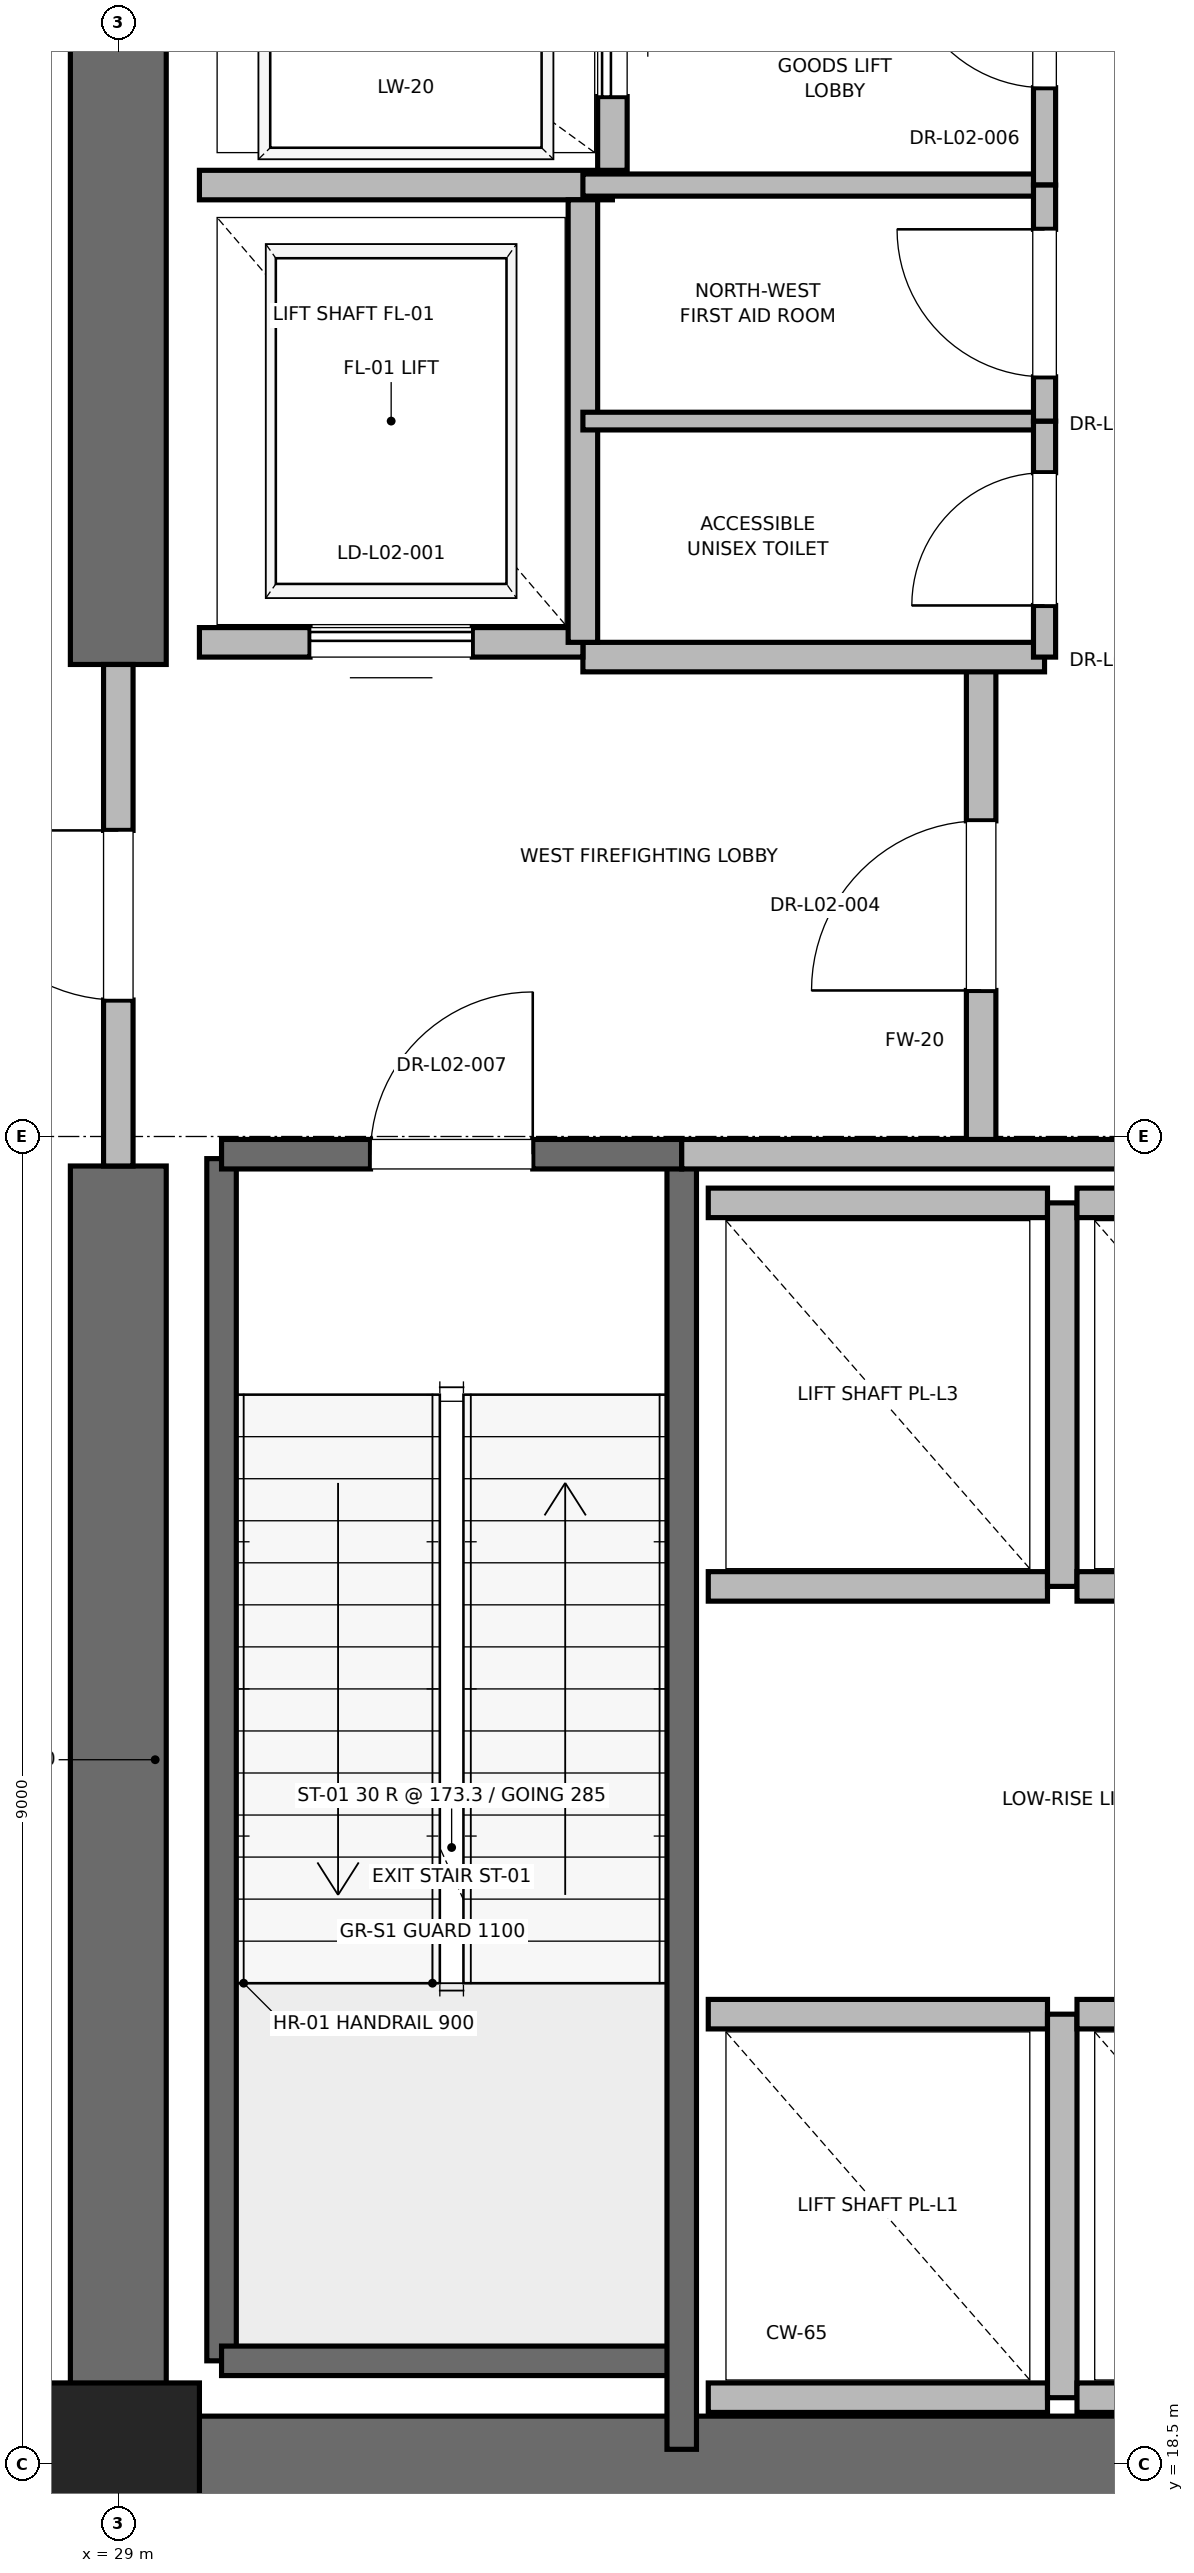
"""IFC4 building model, lengths in metres.
Left out: names, types, materials, properties, quantities, classifications, styles, units other than length and angle.
Written with IfcOpenShell. Run it as: python <this file> out.ifc"""

import sys

from ifc_helpers import new_model, si_unit, direction, frame, frame_2d, origin, origin_2d, place, context, subcontext, project, spatial, rectangle, extrude, element, fill, save


model = new_model("IFC4")
c1 = context("Model", 3, precision=1e-05, world=origin(), true_north=direction((0.0, 1.0)))
c2 = subcontext(c1, "Body", "Model", "MODEL_VIEW")
j1 = project(units=[si_unit("LENGTHUNIT", "METRE"), si_unit("PLANEANGLEUNIT", "RADIAN")], contexts=[c1])
p1 = place(None, origin())
s1 = spatial("IfcSite", under=j1, at=p1, CompositionType="ELEMENT")
p2 = place(p1, origin())
s2 = spatial("IfcBuilding", under=s1, at=p2, CompositionType="ELEMENT")
p3 = place(p2, frame((0.0, 0.0, 11.2)))
s3 = spatial("IfcBuildingStorey", under=s2, at=p3, CompositionType="ELEMENT", Elevation=11.2)
p4 = place(p3, frame((29.0, 18.5, 0.0), z_axis=(0.0, 0.0, 1.0), x_axis=(1.0, 0.0, 0.0)))
e1 = element("IfcColumn", 1, at=p4, inside=s3, PredefinedType="PILASTER", context=c2, shape_type="SweptSolid", body=[
    extrude(rectangle(XDim=1.1, YDim=1.1, at=origin_2d()), origin(), (0.0, 0.0, 1.0), 5.2),
])
p5 = place(p3, frame((29.0, 18.5, 0.0), z_axis=(0.0, 0.0, 1.0), x_axis=(1.0, 0.0, 0.0)))
e2 = element("IfcWall", 2, at=p5, inside=s3, PredefinedType="SHEAR", context=c2, shape_type="SweptSolid", body=[
    extrude(rectangle(XDim=9.2, YDim=0.65, at=frame_2d((4.6, 0.0))), origin(), (0.0, 0.0, 1.0), 4.92),
])
p6 = place(p3, frame((29.0, 18.5, 0.0), z_axis=(0.0, 0.0, 1.0), x_axis=(0.0, 1.0, 0.0)))
e3 = element("IfcWall", 3, at=p6, inside=s3, PredefinedType="SHEAR", context=c2, shape_type="SweptSolid", body=[
    extrude(rectangle(XDim=8.8, YDim=0.65, at=frame_2d((4.4, 0.0))), origin(), (0.0, 0.0, 1.0), 4.92),
])
p7 = place(p3, frame((29.0, 30.7, 0.0), z_axis=(0.0, 0.0, 1.0), x_axis=(0.0, 1.0, 0.0)))
e4 = element("IfcWall", 4, at=p7, inside=s3, PredefinedType="SHEAR", context=c2, shape_type="SweptSolid", body=[
    extrude(rectangle(XDim=5.8, YDim=0.65, at=frame_2d((2.9, 0.0))), origin(), (0.0, 0.0, 1.0), 4.92),
])
p8 = place(p3, frame((29.7, 19.2, 0.0), z_axis=(0.0, 0.0, 1.0), x_axis=(0.0, 1.0, 0.0)))
e5 = element("IfcWall", 5, at=p8, inside=s3, PredefinedType="SOLIDWALL", context=c2, shape_type="SweptSolid", body=[
    extrude(rectangle(XDim=8.15, YDim=0.2, at=frame_2d((4.075, 0.0))), origin(), (0.0, 0.0, 1.0), 4.92),
])
p9 = place(p3, frame((29.7, 19.2, 0.0), z_axis=(0.0, 0.0, 1.0), x_axis=(1.0, 0.0, 0.0)))
e6 = element("IfcWall", 6, at=p9, inside=s3, PredefinedType="SOLIDWALL", context=c2, shape_type="SweptSolid", body=[
    extrude(rectangle(XDim=3.12, YDim=0.2, at=frame_2d((1.56, 0.0))), origin(), (0.0, 0.0, 1.0), 4.92),
])
p10 = place(p3, frame((32.82, 18.6, 0.0), z_axis=(0.0, 0.0, 1.0), x_axis=(0.0, 1.0, 0.0)))
e7 = element("IfcWall", 7, at=p10, inside=s3, PredefinedType="SOLIDWALL", context=c2, shape_type="SweptSolid", body=[
    extrude(rectangle(XDim=8.78, YDim=0.2, at=frame_2d((4.39, 0.0))), origin(), (0.0, 0.0, 1.0), 4.92),
])
p11 = place(p3, frame((29.7, 27.38, 0.0), z_axis=(0.0, 0.0, 1.0), x_axis=(1.0, 0.0, 0.0)))
e8 = element("IfcWall", 8, at=p11, inside=s3, PredefinedType="SOLIDWALL", context=c2, shape_type="SweptSolid", body=[
    extrude(rectangle(XDim=3.12, YDim=0.2, at=frame_2d((1.56, 0.0))), origin(), (0.0, 0.0, 1.0), 4.92),
])
p12 = place(p11, frame((1.01, 0.0, 0.0)))
e9 = element("IfcOpeningElement", 9, at=p12, cuts=e8, PredefinedType="OPENING", context=c2, shape_type="SweptSolid", body=[
    extrude(rectangle(XDim=1.1, YDim=2.15, at=frame_2d((0.55, 1.075))), frame((0.0, 0.1, 0.0), z_axis=(0.0, -1.0, 0.0), x_axis=(1.0, 0.0, 0.0)), (0.0, 0.0, 1.0), 0.2),
])
p13 = place(p3, frame((34.85, 27.38, 0.0), z_axis=(0.0, 0.0, 1.0), x_axis=(0.0, 1.0, 0.0)))
e10 = element("IfcWall", 10, at=p13, inside=s3, PredefinedType="PARTITIONING", context=c2, shape_type="SweptSolid", body=[
    extrude(rectangle(XDim=3.37, YDim=0.2, at=frame_2d((1.685, 0.0))), origin(), (0.0, 0.0, 1.0), 4.92),
])
p14 = place(p13, frame((1.11, 0.0, 0.0)))
e11 = element("IfcOpeningElement", 11, at=p14, cuts=e10, PredefinedType="OPENING", context=c2, shape_type="SweptSolid", body=[
    extrude(rectangle(XDim=1.15, YDim=2.2, at=frame_2d((0.575, 1.1))), frame((0.0, 0.1, 0.0), z_axis=(0.0, -1.0, 0.0), x_axis=(1.0, 0.0, 0.0)), (0.0, 0.0, 1.0), 0.2),
])
p15 = place(p3, frame((29.0, 27.3, 0.0), z_axis=(0.0, 0.0, 1.0), x_axis=(0.0, 1.0, 0.0)))
e12 = element("IfcWall", 12, at=p15, inside=s3, PredefinedType="PARTITIONING", context=c2, shape_type="SweptSolid", body=[
    extrude(rectangle(XDim=3.4, YDim=0.2, at=frame_2d((1.7, 0.0))), origin(), (0.0, 0.0, 1.0), 3.7),
])
p16 = place(p15, frame((1.125, 0.0, 0.0)))
e13 = element("IfcOpeningElement", 13, at=p16, cuts=e12, PredefinedType="OPENING", context=c2, shape_type="SweptSolid", body=[
    extrude(rectangle(XDim=1.15, YDim=2.2, at=frame_2d((0.575, 1.1))), frame((0.0, 0.1, 0.0), z_axis=(0.0, -1.0, 0.0), x_axis=(1.0, 0.0, 0.0)), (0.0, 0.0, 1.0), 0.2),
])
p17 = place(p3, frame((32.82, 27.38, 0.0), z_axis=(0.0, 0.0, 1.0), x_axis=(1.0, 0.0, 0.0)))
e14 = element("IfcWall", 14, at=p17, inside=s3, PredefinedType="PARTITIONING", context=c2, shape_type="SweptSolid", body=[
    extrude(rectangle(XDim=5.62, YDim=0.2, at=frame_2d((2.81, 0.0))), origin(), (0.0, 0.0, 1.0), 4.92),
])
p18 = place(p3, frame((32.15, 30.75, 0.0), z_axis=(0.0, 0.0, 1.0), x_axis=(1.0, 0.0, 0.0)))
e15 = element("IfcWall", 15, at=p18, inside=s3, PredefinedType="PARTITIONING", context=c2, shape_type="SweptSolid", body=[
    extrude(rectangle(XDim=3.13, YDim=0.2, at=frame_2d((1.565, 0.0))), origin(), (0.0, 0.0, 1.0), 4.92),
])
p19 = place(p3, frame((29.55, 30.85, 0.0), z_axis=(0.0, 0.0, 1.0), x_axis=(1.0, 0.0, 0.0)))
e16 = element("IfcWall", 16, at=p19, inside=s3, PredefinedType="SOLIDWALL", context=c2, shape_type="SweptSolid", body=[
    extrude(rectangle(XDim=2.6, YDim=0.2, at=frame_2d((1.3, 0.0))), origin(), (0.0, 0.0, 1.0), 3.7),
])
p20 = place(p19, frame((0.75, 0.0, 0.0)))
e17 = element("IfcOpeningElement", 17, at=p20, cuts=e16, PredefinedType="OPENING", context=c2, shape_type="SweptSolid", body=[
    extrude(rectangle(XDim=1.1, YDim=2.2, at=frame_2d((0.55, 1.1))), frame((0.0, 0.1, 0.0), z_axis=(0.0, -1.0, 0.0), x_axis=(1.0, 0.0, 0.0)), (0.0, 0.0, 1.0), 0.2),
])
p21 = place(p3, frame((29.55, 33.95, 0.0), z_axis=(0.0, 0.0, 1.0), x_axis=(1.0, 0.0, 0.0)))
e18 = element("IfcWall", 18, at=p21, inside=s3, PredefinedType="SOLIDWALL", context=c2, shape_type="SweptSolid", body=[
    extrude(rectangle(XDim=2.8, YDim=0.2, at=frame_2d((1.4, 0.0))), origin(), (0.0, 0.0, 1.0), 4.92),
])
p22 = place(p3, frame((32.15, 30.85, 0.0), z_axis=(0.0, 0.0, 1.0), x_axis=(0.0, 1.0, 0.0)))
e19 = element("IfcWall", 19, at=p22, inside=s3, PredefinedType="SOLIDWALL", context=c2, shape_type="SweptSolid", body=[
    extrude(rectangle(XDim=3.0, YDim=0.2, at=frame_2d((1.5, 0.0))), origin(), (0.0, 0.0, 1.0), 4.92),
])
p23 = place(p3, frame((32.35, 34.05, 0.0), z_axis=(0.0, 0.0, 1.0), x_axis=(0.0, 1.0, 0.0)))
e20 = element("IfcWall", 20, at=p23, inside=s3, PredefinedType="SOLIDWALL", context=c2, shape_type="SweptSolid", body=[
    extrude(rectangle(XDim=2.1, YDim=0.2, at=frame_2d((1.05, 0.0))), origin(), (0.0, 0.0, 1.0), 4.92),
])
p24 = place(p23, frame((0.5, 0.0, 0.0)))
e21 = element("IfcOpeningElement", 21, at=p24, cuts=e20, PredefinedType="OPENING", context=c2, shape_type="SweptSolid", body=[
    extrude(rectangle(XDim=1.1, YDim=2.2, at=frame_2d((0.55, 1.1))), frame((0.0, 0.1, 0.0), z_axis=(0.0, -1.0, 0.0), x_axis=(1.0, 0.0, 0.0)), (0.0, 0.0, 1.0), 0.2),
])
for number, where, z_axis, x_axis in (
    (22, (33.0, 18.95, 0.0), (0.0, 0.0, 1.0), (1.0, 0.0, 0.0)),
    (23, (35.3, 21.55, 0.0), (0.0, 0.0, 1.0), (-1.0, 0.0, 0.0)),
):
    element("IfcWall", number, at=place(p3, frame(where, z_axis=z_axis, x_axis=x_axis)), inside=s3, PredefinedType="SOLIDWALL", context=c2, shape_type="SweptSolid", body=[
        extrude(rectangle(XDim=2.3, YDim=0.2, at=frame_2d((1.15, 0.0))), origin(), (0.0, 0.0, 1.0), 4.92),
    ])
p25 = place(p3, frame((35.4, 18.95, 0.0), z_axis=(0.0, 0.0, 1.0), x_axis=(0.0, 1.0, 0.0)))
e24 = element("IfcWall", 24, at=p25, inside=s3, PredefinedType="SOLIDWALL", context=c2, shape_type="SweptSolid", body=[
    extrude(rectangle(XDim=2.6, YDim=0.2, at=frame_2d((1.3, 0.0))), origin(), (0.0, 0.0, 1.0), 4.92),
])
p26 = place(p3, frame((35.5, 18.95, 0.0), z_axis=(0.0, 0.0, 1.0), x_axis=(1.0, 0.0, 0.0)))
e25 = element("IfcWall", 25, at=p26, inside=s3, PredefinedType="SOLIDWALL", context=c2, shape_type="SweptSolid", body=[
    extrude(rectangle(XDim=2.3, YDim=0.2, at=frame_2d((1.15, 0.0))), origin(), (0.0, 0.0, 1.0), 3.7),
])
for number, where, z_axis, x_axis in (
    (26, (37.8, 21.55, 0.0), (0.0, 0.0, 1.0), (-1.0, 0.0, 0.0)),
    (27, (33.0, 24.45, 0.0), (0.0, 0.0, 1.0), (1.0, 0.0, 0.0)),
    (28, (35.3, 27.05, 0.0), (0.0, 0.0, 1.0), (-1.0, 0.0, 0.0)),
):
    element("IfcWall", number, at=place(p3, frame(where, z_axis=z_axis, x_axis=x_axis)), inside=s3, PredefinedType="SOLIDWALL", context=c2, shape_type="SweptSolid", body=[
        extrude(rectangle(XDim=2.3, YDim=0.2, at=frame_2d((1.15, 0.0))), origin(), (0.0, 0.0, 1.0), 4.92),
    ])
p27 = place(p3, frame((35.4, 24.45, 0.0), z_axis=(0.0, 0.0, 1.0), x_axis=(0.0, 1.0, 0.0)))
e29 = element("IfcWall", 29, at=p27, inside=s3, PredefinedType="SOLIDWALL", context=c2, shape_type="SweptSolid", body=[
    extrude(rectangle(XDim=2.6, YDim=0.2, at=frame_2d((1.3, 0.0))), origin(), (0.0, 0.0, 1.0), 4.92),
])
for number, where, z_axis, x_axis in (
    (30, (35.5, 24.45, 0.0), (0.0, 0.0, 1.0), (1.0, 0.0, 0.0)),
    (31, (37.8, 27.05, 0.0), (0.0, 0.0, 1.0), (-1.0, 0.0, 0.0)),
):
    element("IfcWall", number, at=place(p3, frame(where, z_axis=z_axis, x_axis=x_axis)), inside=s3, PredefinedType="SOLIDWALL", context=c2, shape_type="SweptSolid", body=[
        extrude(rectangle(XDim=2.3, YDim=0.2, at=frame_2d((1.15, 0.0))), origin(), (0.0, 0.0, 1.0), 4.92),
    ])
p28 = place(p3, frame((32.15, 33.95, 0.0), z_axis=(0.0, 0.0, 1.0), x_axis=(1.0, 0.0, 0.0)))
e32 = element("IfcWall", 32, at=p28, inside=s3, PredefinedType="PARTITIONING", context=c2, shape_type="SweptSolid", body=[
    extrude(rectangle(XDim=3.13, YDim=0.15, at=frame_2d((1.565, 0.0))), origin(), (0.0, 0.0, 1.0), 2.85),
])
p29 = place(p3, frame((35.28, 33.95, 0.0), z_axis=(0.0, 0.0, 1.0), x_axis=(0.0, 1.0, 0.0)))
e33 = element("IfcWall", 33, at=p29, inside=s3, PredefinedType="PARTITIONING", context=c2, shape_type="SweptSolid", body=[
    extrude(rectangle(XDim=2.27, YDim=0.15, at=frame_2d((1.135, 0.0))), origin(), (0.0, 0.0, 1.0), 2.85),
])
p30 = place(p29, frame((0.66, 0.0, 0.0)))
e34 = element("IfcOpeningElement", 34, at=p30, cuts=e33, PredefinedType="OPENING", context=c2, shape_type="SweptSolid", body=[
    extrude(rectangle(XDim=0.95, YDim=2.15, at=frame_2d((0.475, 1.075))), frame((0.0, 0.075, 0.0), z_axis=(0.0, -1.0, 0.0), x_axis=(1.0, 0.0, 0.0)), (0.0, 0.0, 1.0), 0.15),
])
p31 = place(p3, frame((32.15, 32.35, 0.0), z_axis=(0.0, 0.0, 1.0), x_axis=(1.0, 0.0, 0.0)))
e35 = element("IfcWall", 35, at=p31, inside=s3, PredefinedType="PARTITIONING", context=c2, shape_type="SweptSolid", body=[
    extrude(rectangle(XDim=3.13, YDim=0.12, at=frame_2d((1.565, 0.0))), origin(), (0.0, 0.0, 1.0), 2.85),
])
p32 = place(p3, frame((35.28, 30.75, 0.0), z_axis=(0.0, 0.0, 1.0), x_axis=(0.0, 1.0, 0.0)))
e36 = element("IfcWall", 36, at=p32, inside=s3, PredefinedType="PARTITIONING", context=c2, shape_type="SweptSolid", body=[
    extrude(rectangle(XDim=1.6, YDim=0.15, at=frame_2d((0.8, 0.0))), origin(), (0.0, 0.0, 1.0), 2.85),
])
p33 = place(p32, frame((0.35, 0.0, 0.0)))
e37 = element("IfcOpeningElement", 37, at=p33, cuts=e36, PredefinedType="OPENING", context=c2, shape_type="SweptSolid", body=[
    extrude(rectangle(XDim=0.9, YDim=2.1, at=frame_2d((0.45, 1.05))), frame((0.0, 0.075, 0.0), z_axis=(0.0, -1.0, 0.0), x_axis=(1.0, 0.0, 0.0)), (0.0, 0.0, 1.0), 0.15),
])
p34 = place(p3, frame((35.28, 32.35, 0.0), z_axis=(0.0, 0.0, 1.0), x_axis=(0.0, 1.0, 0.0)))
e38 = element("IfcWall", 38, at=p34, inside=s3, PredefinedType="PARTITIONING", context=c2, shape_type="SweptSolid", body=[
    extrude(rectangle(XDim=1.6, YDim=0.15, at=frame_2d((0.8, 0.0))), origin(), (0.0, 0.0, 1.0), 2.85),
])
p35 = place(p34, frame((0.3, 0.0, 0.0)))
e39 = element("IfcOpeningElement", 39, at=p35, cuts=e38, PredefinedType="OPENING", context=c2, shape_type="SweptSolid", body=[
    extrude(rectangle(XDim=1.0, YDim=2.15, at=frame_2d((0.5, 1.075))), frame((0.0, 0.075, 0.0), z_axis=(0.0, -1.0, 0.0), x_axis=(1.0, 0.0, 0.0)), (0.0, 0.0, 1.0), 0.15),
])
p36 = place(p12, origin())
e40 = element("IfcDoor", 40, at=p36, inside=s3, OperationType="SINGLE_SWING_RIGHT", PredefinedType="DOOR", context=c2, shape_type="SweptSolid", body=[
    extrude(rectangle(XDim=1.1, YDim=2.15, at=frame_2d((0.55, 1.075))), frame((0.0, 0.025, 0.0), z_axis=(0.0, -1.0, 0.0), x_axis=(1.0, 0.0, 0.0)), (0.0, 0.0, 1.0), 0.05),
])
fill(e9, e40)
p37 = place(p14, origin())
e41 = element("IfcDoor", 41, at=p37, inside=s3, OperationType="SINGLE_SWING_LEFT", PredefinedType="DOOR", context=c2, shape_type="SweptSolid", body=[
    extrude(rectangle(XDim=1.15, YDim=2.2, at=frame_2d((0.575, 1.1))), frame((0.0, 0.025, 0.0), z_axis=(0.0, -1.0, 0.0), x_axis=(1.0, 0.0, 0.0)), (0.0, 0.0, 1.0), 0.05),
])
fill(e11, e41)
p38 = place(p16, origin())
e42 = element("IfcDoor", 42, at=p38, inside=s3, OperationType="SINGLE_SWING_RIGHT", PredefinedType="DOOR", context=c2, shape_type="SweptSolid", body=[
    extrude(rectangle(XDim=1.15, YDim=2.2, at=frame_2d((0.575, 1.1))), frame((0.0, 0.025, 0.0), z_axis=(0.0, -1.0, 0.0), x_axis=(1.0, 0.0, 0.0)), (0.0, 0.0, 1.0), 0.05),
])
fill(e13, e42)
p39 = place(p20, origin())
e43 = element("IfcDoor", 43, at=p39, inside=s3, OperationType="SLIDING_TO_RIGHT", PredefinedType="DOOR", context=c2, shape_type="SweptSolid", body=[
    extrude(rectangle(XDim=1.1, YDim=2.2, at=frame_2d((0.55, 1.1))), frame((0.0, 0.025, 0.0), z_axis=(0.0, -1.0, 0.0), x_axis=(1.0, 0.0, 0.0)), (0.0, 0.0, 1.0), 0.05),
])
fill(e17, e43)
p40 = place(p24, origin())
e44 = element("IfcDoor", 44, at=p40, inside=s3, OperationType="SLIDING_TO_RIGHT", PredefinedType="DOOR", context=c2, shape_type="SweptSolid", body=[
    extrude(rectangle(XDim=1.1, YDim=2.2, at=frame_2d((0.55, 1.1))), frame((0.0, 0.025, 0.0), z_axis=(0.0, -1.0, 0.0), x_axis=(1.0, 0.0, 0.0)), (0.0, 0.0, 1.0), 0.05),
])
fill(e21, e44)
p41 = place(p30, origin())
e45 = element("IfcDoor", 45, at=p41, inside=s3, OperationType="SINGLE_SWING_RIGHT", PredefinedType="DOOR", context=c2, shape_type="SweptSolid", body=[
    extrude(rectangle(XDim=0.95, YDim=2.15, at=frame_2d((0.475, 1.075))), frame((0.0, 0.025, 0.0), z_axis=(0.0, -1.0, 0.0), x_axis=(1.0, 0.0, 0.0)), (0.0, 0.0, 1.0), 0.05),
])
fill(e34, e45)
p42 = place(p33, origin())
e46 = element("IfcDoor", 46, at=p42, inside=s3, OperationType="SINGLE_SWING_LEFT", PredefinedType="DOOR", context=c2, shape_type="SweptSolid", body=[
    extrude(rectangle(XDim=0.9, YDim=2.1, at=frame_2d((0.45, 1.05))), frame((0.0, 0.025, 0.0), z_axis=(0.0, -1.0, 0.0), x_axis=(1.0, 0.0, 0.0)), (0.0, 0.0, 1.0), 0.05),
])
fill(e37, e46)
p43 = place(p35, origin())
e47 = element("IfcDoor", 47, at=p43, inside=s3, OperationType="SINGLE_SWING_RIGHT", PredefinedType="DOOR", context=c2, shape_type="SweptSolid", body=[
    extrude(rectangle(XDim=1.0, YDim=2.15, at=frame_2d((0.5, 1.075))), frame((0.0, 0.025, 0.0), z_axis=(0.0, -1.0, 0.0), x_axis=(1.0, 0.0, 0.0)), (0.0, 0.0, 1.0), 0.05),
])
fill(e39, e47)
save(model, sys.argv[1])
